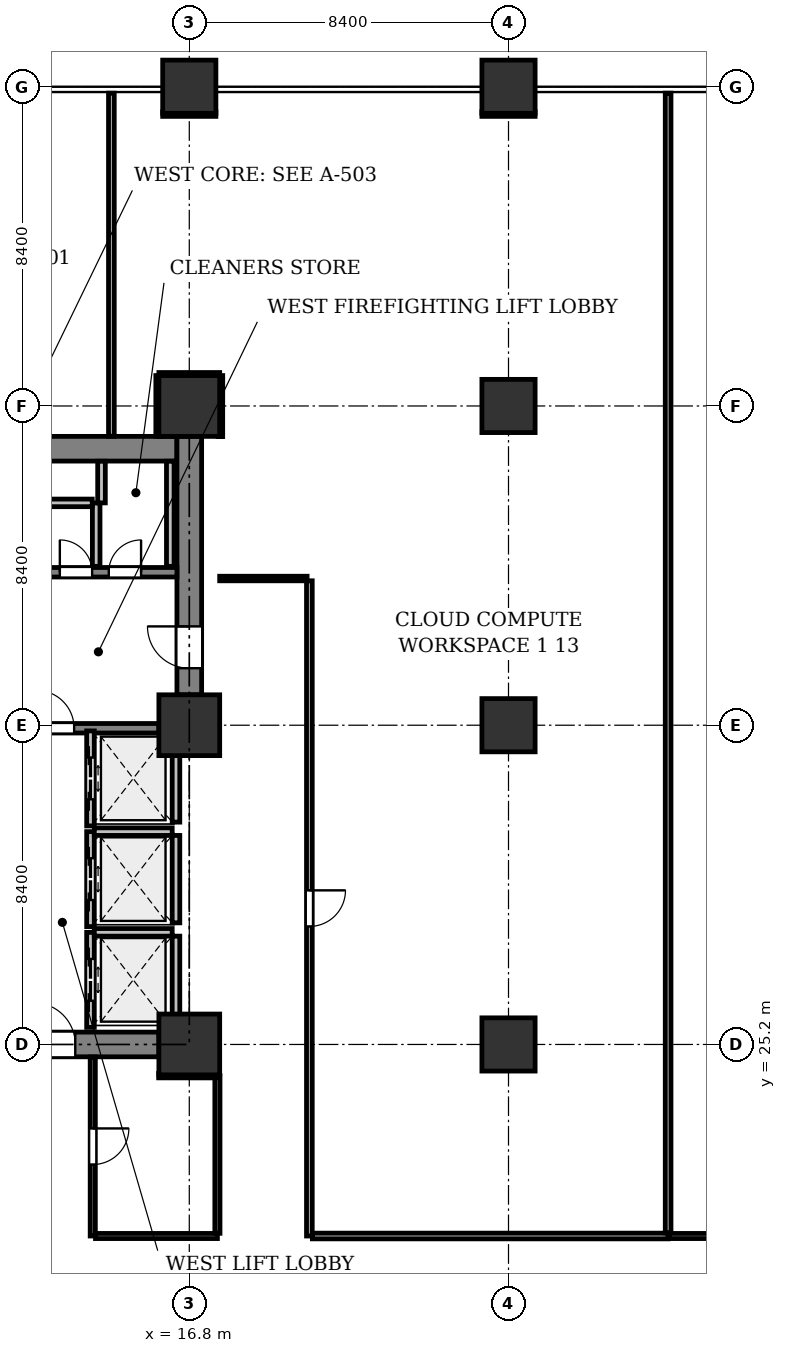
"""IFC4 building model, lengths in metres.
Left out: names, types, materials, properties, quantities, classifications, styles, units other than length and angle.
Written with IfcOpenShell. Run it as: python <this file> out.ifc"""

import sys

from ifc_helpers import new_model, si_unit, direction, frame, frame_2d, origin, origin_2d, place, context, subcontext, project, spatial, rectangle, extrude, element, fill, save


model = new_model("IFC4")
c1 = context("Model", 3, precision=1e-05, world=origin(), true_north=direction((0.0, 1.0)))
c2 = subcontext(c1, "Body", "Model", "MODEL_VIEW")
j1 = project(units=[si_unit("LENGTHUNIT", "METRE"), si_unit("PLANEANGLEUNIT", "RADIAN")], contexts=[c1])
p1 = place(None, origin())
s1 = spatial("IfcSite", under=j1, at=p1, CompositionType="ELEMENT")
p2 = place(p1, origin())
s2 = spatial("IfcBuilding", under=s1, at=p2, CompositionType="ELEMENT")
p3 = place(p2, frame((0.0, 0.0, 10.2)))
s3 = spatial("IfcBuildingStorey", under=s2, at=p3, CompositionType="ELEMENT", Elevation=10.2)
for number, where, z_axis, x_axis in (
    (1, (16.8, 25.2, 0.0), (0.0, 0.0, 1.0), (1.0, 0.0, 0.0)),
    (2, (16.8, 33.6, 0.0), (0.0, 0.0, 1.0), (1.0, 0.0, 0.0)),
    (3, (16.8, 42.0, 0.0), (0.0, 0.0, 1.0), (1.0, 0.0, 0.0)),
):
    element("IfcColumn", number, at=place(p3, frame(where, z_axis=z_axis, x_axis=x_axis)), inside=s3, PredefinedType="COLUMN", context=c2, shape_type="SweptSolid", body=[
        extrude(rectangle(XDim=1.6, YDim=1.6, at=origin_2d()), origin(), (0.0, 0.0, 1.0), 4.8),
    ])
for number, where, z_axis, x_axis in (
    (4, (16.8, 50.4, 0.0), (0.0, 0.0, 1.0), (1.0, 0.0, 0.0)),
    (5, (25.2, 25.2, 0.0), (0.0, 0.0, 1.0), (1.0, 0.0, 0.0)),
    (6, (25.2, 33.6, 0.0), (0.0, 0.0, 1.0), (1.0, 0.0, 0.0)),
    (7, (25.2, 42.0, 0.0), (0.0, 0.0, 1.0), (1.0, 0.0, 0.0)),
    (8, (25.2, 50.4, 0.0), (0.0, 0.0, 1.0), (1.0, 0.0, 0.0)),
):
    element("IfcColumn", number, at=place(p3, frame(where, z_axis=z_axis, x_axis=x_axis)), inside=s3, PredefinedType="COLUMN", context=c2, shape_type="SweptSolid", body=[
        extrude(rectangle(XDim=1.4, YDim=1.4, at=origin_2d()), origin(), (0.0, 0.0, 1.0), 4.8),
    ])
p4 = place(p3, frame((8.725, 40.875, 0.0), z_axis=(0.0, 0.0, 1.0), x_axis=(1.0, 0.0, 0.0)))
e9 = element("IfcWall", 9, at=p4, inside=s3, PredefinedType="SHEAR", context=c2, shape_type="SweptSolid", body=[
    extrude(rectangle(XDim=7.75, YDim=0.65, at=frame_2d((3.875, 0.0))), origin(), (0.0, 0.0, 1.0), 4.525),
])
p5 = place(p3, frame((16.8, 34.4, 0.0), z_axis=(0.0, 0.0, 1.0), x_axis=(0.0, 1.0, 0.0)))
e10 = element("IfcWall", 10, at=p5, inside=s3, PredefinedType="SHEAR", context=c2, shape_type="SweptSolid", body=[
    extrude(rectangle(XDim=6.8, YDim=0.65, at=frame_2d((3.4, 0.0))), origin(), (0.0, 0.0, 1.0), 4.525),
])
p6 = place(p5, frame((0.7, 0.0, 0.0)))
e11 = element("IfcOpeningElement", 11, at=p6, cuts=e10, PredefinedType="OPENING", context=c2, shape_type="SweptSolid", body=[
    extrude(rectangle(XDim=1.1, YDim=2.15, at=frame_2d((0.55, 1.075))), frame((0.0, 0.335, 0.0), z_axis=(0.0, -1.0, 0.0), x_axis=(1.0, 0.0, 0.0)), (0.0, 0.0, 1.0), 0.67),
])
p7 = place(p3, frame((9.2, 25.2, 0.0), z_axis=(0.0, 0.0, 1.0), x_axis=(1.0, 0.0, 0.0)))
e12 = element("IfcWall", 12, at=p7, inside=s3, PredefinedType="SHEAR", context=c2, shape_type="SweptSolid", body=[
    extrude(rectangle(XDim=6.8, YDim=0.65, at=frame_2d((3.4, 0.0))), origin(), (0.0, 0.0, 1.0), 4.525),
])
p8 = place(p7, frame((3.5, 0.0, 0.0)))
e13 = element("IfcOpeningElement", 13, at=p8, cuts=e12, PredefinedType="OPENING", context=c2, shape_type="SweptSolid", body=[
    extrude(rectangle(XDim=1.1, YDim=2.15, at=frame_2d((0.55, 1.075))), frame((0.0, 0.335, 0.0), z_axis=(0.0, -1.0, 0.0), x_axis=(1.0, 0.0, 0.0)), (0.0, 0.0, 1.0), 0.67),
])
p9 = place(p3, frame((12.45, 33.52, 0.0), z_axis=(0.0, 0.0, 1.0), x_axis=(1.0, 0.0, 0.0)))
e14 = element("IfcWall", 14, at=p9, inside=s3, PredefinedType="SHEAR", context=c2, shape_type="SweptSolid", body=[
    extrude(rectangle(XDim=3.55, YDim=0.25, at=frame_2d((1.775, 0.0))), origin(), (0.0, 0.0, 1.0), 4.525),
])
p10 = place(p9, frame((0.32, 0.0, 0.0)))
e15 = element("IfcOpeningElement", 15, at=p10, cuts=e14, PredefinedType="OPENING", context=c2, shape_type="SweptSolid", body=[
    extrude(rectangle(XDim=1.0, YDim=2.15, at=frame_2d((0.5, 1.075))), frame((0.0, 0.135, 0.0), z_axis=(0.0, -1.0, 0.0), x_axis=(1.0, 0.0, 0.0)), (0.0, 0.0, 1.0), 0.27),
])
p11 = place(p3, frame((12.45, 37.625, 0.0), z_axis=(0.0, 0.0, 1.0), x_axis=(1.0, 0.0, 0.0)))
e16 = element("IfcWall", 16, at=p11, inside=s3, PredefinedType="SHEAR", context=c2, shape_type="SweptSolid", body=[
    extrude(rectangle(XDim=4.025, YDim=0.25, at=frame_2d((2.013, 0.0))), origin(), (0.0, 0.0, 1.0), 4.525),
])
p12 = place(p11, frame((0.944, 0.0, 0.0)))
e17 = element("IfcOpeningElement", 17, at=p12, cuts=e16, PredefinedType="OPENING", context=c2, shape_type="SweptSolid", body=[
    extrude(rectangle(XDim=0.85, YDim=2.15, at=frame_2d((0.425, 1.075))), frame((0.0, 0.135, 0.0), z_axis=(0.0, -1.0, 0.0), x_axis=(1.0, 0.0, 0.0)), (0.0, 0.0, 1.0), 0.27),
])
p13 = place(p11, frame((2.231, 0.0, 0.0)))
e18 = element("IfcOpeningElement", 18, at=p13, cuts=e16, PredefinedType="OPENING", context=c2, shape_type="SweptSolid", body=[
    extrude(rectangle(XDim=0.85, YDim=2.15, at=frame_2d((0.425, 1.075))), frame((0.0, 0.135, 0.0), z_axis=(0.0, -1.0, 0.0), x_axis=(1.0, 0.0, 0.0)), (0.0, 0.0, 1.0), 0.27),
])
p14 = place(p3, frame((14.2, 25.65, 0.0), z_axis=(0.0, 0.0, 1.0), x_axis=(0.0, 1.0, 0.0)))
e19 = element("IfcWall", 19, at=p14, inside=s3, PredefinedType="PARTITIONING", context=c2, shape_type="SweptSolid", body=[
    extrude(rectangle(XDim=2.5, YDim=0.2, at=frame_2d((1.25, 0.0))), origin(), (0.0, 0.0, 1.0), 4.525),
])
p15 = place(p14, frame((0.7, 0.0, 0.0)))
e20 = element("IfcOpeningElement", 20, at=p15, cuts=e19, PredefinedType="OPENING", context=c2, shape_type="SweptSolid", body=[
    extrude(rectangle(XDim=1.1, YDim=2.2, at=frame_2d((0.55, 1.1))), frame((0.0, 0.11, 0.0), z_axis=(0.0, -1.0, 0.0), x_axis=(1.0, 0.0, 0.0)), (0.0, 0.0, 1.0), 0.22),
])
p16 = place(p3, frame((16.45, 25.75, 0.0), z_axis=(0.0, 0.0, 1.0), x_axis=(0.0, 1.0, 0.0)))
e21 = element("IfcWall", 21, at=p16, inside=s3, PredefinedType="PARTITIONING", context=c2, shape_type="SweptSolid", body=[
    extrude(rectangle(XDim=2.3, YDim=0.2, at=frame_2d((1.15, 0.0))), origin(), (0.0, 0.0, 1.0), 4.525),
])
p17 = place(p3, frame((14.3, 28.15, 0.0), z_axis=(0.0, 0.0, 1.0), x_axis=(1.0, 0.0, 0.0)))
e22 = element("IfcWall", 22, at=p17, inside=s3, PredefinedType="PARTITIONING", context=c2, shape_type="SweptSolid", body=[
    extrude(rectangle(XDim=2.05, YDim=0.2, at=frame_2d((1.025, 0.0))), origin(), (0.0, 0.0, 1.0), 4.525),
])
p18 = place(p3, frame((14.2, 28.3, 0.0), z_axis=(0.0, 0.0, 1.0), x_axis=(0.0, 1.0, 0.0)))
e23 = element("IfcWall", 23, at=p18, inside=s3, PredefinedType="PARTITIONING", context=c2, shape_type="SweptSolid", body=[
    extrude(rectangle(XDim=2.5, YDim=0.2, at=frame_2d((1.25, 0.0))), origin(), (0.0, 0.0, 1.0), 4.525),
])
p19 = place(p18, frame((0.7, 0.0, 0.0)))
e24 = element("IfcOpeningElement", 24, at=p19, cuts=e23, PredefinedType="OPENING", context=c2, shape_type="SweptSolid", body=[
    extrude(rectangle(XDim=1.1, YDim=2.2, at=frame_2d((0.55, 1.1))), frame((0.0, 0.11, 0.0), z_axis=(0.0, -1.0, 0.0), x_axis=(1.0, 0.0, 0.0)), (0.0, 0.0, 1.0), 0.22),
])
p20 = place(p3, frame((16.45, 28.4, 0.0), z_axis=(0.0, 0.0, 1.0), x_axis=(0.0, 1.0, 0.0)))
e25 = element("IfcWall", 25, at=p20, inside=s3, PredefinedType="PARTITIONING", context=c2, shape_type="SweptSolid", body=[
    extrude(rectangle(XDim=2.3, YDim=0.2, at=frame_2d((1.15, 0.0))), origin(), (0.0, 0.0, 1.0), 4.525),
])
p21 = place(p3, frame((14.3, 30.8, 0.0), z_axis=(0.0, 0.0, 1.0), x_axis=(1.0, 0.0, 0.0)))
e26 = element("IfcWall", 26, at=p21, inside=s3, PredefinedType="PARTITIONING", context=c2, shape_type="SweptSolid", body=[
    extrude(rectangle(XDim=2.05, YDim=0.2, at=frame_2d((1.025, 0.0))), origin(), (0.0, 0.0, 1.0), 4.525),
])
p22 = place(p3, frame((14.2, 30.95, 0.0), z_axis=(0.0, 0.0, 1.0), x_axis=(0.0, 1.0, 0.0)))
e27 = element("IfcWall", 27, at=p22, inside=s3, PredefinedType="PARTITIONING", context=c2, shape_type="SweptSolid", body=[
    extrude(rectangle(XDim=2.5, YDim=0.2, at=frame_2d((1.25, 0.0))), origin(), (0.0, 0.0, 1.0), 4.525),
])
p23 = place(p22, frame((0.7, 0.0, 0.0)))
e28 = element("IfcOpeningElement", 28, at=p23, cuts=e27, PredefinedType="OPENING", context=c2, shape_type="SweptSolid", body=[
    extrude(rectangle(XDim=1.1, YDim=2.2, at=frame_2d((0.55, 1.1))), frame((0.0, 0.11, 0.0), z_axis=(0.0, -1.0, 0.0), x_axis=(1.0, 0.0, 0.0)), (0.0, 0.0, 1.0), 0.22),
])
p24 = place(p3, frame((16.45, 31.05, 0.0), z_axis=(0.0, 0.0, 1.0), x_axis=(0.0, 1.0, 0.0)))
e29 = element("IfcWall", 29, at=p24, inside=s3, PredefinedType="PARTITIONING", context=c2, shape_type="SweptSolid", body=[
    extrude(rectangle(XDim=2.3, YDim=0.2, at=frame_2d((1.15, 0.0))), origin(), (0.0, 0.0, 1.0), 4.525),
])
p25 = place(p3, frame((14.35, 37.78, 0.0), z_axis=(0.0, 0.0, 1.0), x_axis=(0.0, 1.0, 0.0)))
e30 = element("IfcWall", 30, at=p25, inside=s3, PredefinedType="PARTITIONING", context=c2, shape_type="SweptSolid", body=[
    extrude(rectangle(XDim=1.67, YDim=0.2, at=frame_2d((0.835, 0.0))), origin(), (0.0, 0.0, 1.0), 3.425),
])
p26 = place(p3, frame((14.246, 39.45, 0.0), z_axis=(0.0, 0.0, 1.0), x_axis=(-1.0, 0.0, 0.0)))
e31 = element("IfcWall", 31, at=p26, inside=s3, PredefinedType="PARTITIONING", context=c2, shape_type="SweptSolid", body=[
    extrude(rectangle(XDim=1.796, YDim=0.2, at=frame_2d((0.898, 0.0))), origin(), (0.0, 0.0, 1.0), 3.425),
])
p27 = place(p3, frame((16.3, 37.78, 0.0), z_axis=(0.0, 0.0, 1.0), x_axis=(0.0, 1.0, 0.0)))
e32 = element("IfcWall", 32, at=p27, inside=s3, PredefinedType="PARTITIONING", context=c2, shape_type="SweptSolid", body=[
    extrude(rectangle(XDim=2.766, YDim=0.2, at=frame_2d((1.383, 0.0))), origin(), (0.0, 0.0, 1.0), 3.425),
])
p28 = place(p3, frame((14.49, 40.546, 0.0), z_axis=(0.0, 0.0, 1.0), x_axis=(0.0, -1.0, 0.0)))
e33 = element("IfcWall", 33, at=p28, inside=s3, PredefinedType="PARTITIONING", context=c2, shape_type="SweptSolid", body=[
    extrude(rectangle(XDim=1.096, YDim=0.2, at=frame_2d((0.548, 0.0))), origin(), (0.0, 0.0, 1.0), 3.425),
])
p29 = place(p3, frame((14.26, 24.871, 0.0), z_axis=(0.0, 0.0, 1.0), x_axis=(0.0, -1.0, 0.0)))
e34 = element("IfcWall", 34, at=p29, inside=s3, PredefinedType="PARTITIONING", context=c2, shape_type="SweptSolid", body=[
    extrude(rectangle(XDim=4.711, YDim=0.135, at=frame_2d((2.355, 0.0))), origin(), (0.0, 0.0, 1.0), 4.525),
])
p30 = place(p29, frame((1.881, 0.0, 0.0)))
e35 = element("IfcOpeningElement", 35, at=p30, cuts=e34, PredefinedType="OPENING", context=c2, shape_type="SweptSolid", body=[
    extrude(rectangle(XDim=0.95, YDim=2.15, at=frame_2d((0.475, 1.075))), frame((0.0, 0.077, 0.0), z_axis=(0.0, -1.0, 0.0), x_axis=(1.0, 0.0, 0.0)), (0.0, 0.0, 1.0), 0.155),
])
p31 = place(p3, frame((14.332, 20.16, 0.0), z_axis=(0.0, 0.0, 1.0), x_axis=(1.0, 0.0, 0.0)))
e36 = element("IfcWall", 36, at=p31, inside=s3, PredefinedType="PARTITIONING", context=c2, shape_type="SweptSolid", body=[
    extrude(rectangle(XDim=3.208, YDim=0.135, at=frame_2d((1.604, 0.0))), origin(), (0.0, 0.0, 1.0), 3.913),
])
p32 = place(p3, frame((17.54, 20.231, 0.0), z_axis=(0.0, 0.0, 1.0), x_axis=(0.0, 1.0, 0.0)))
e37 = element("IfcWall", 37, at=p32, inside=s3, PredefinedType="PARTITIONING", context=c2, shape_type="SweptSolid", body=[
    extrude(rectangle(XDim=4.148, YDim=0.135, at=frame_2d((2.074, 0.0))), origin(), (0.0, 0.0, 1.0), 4.525),
])
p33 = place(p3, frame((17.54, 24.38, 0.0), z_axis=(0.0, 0.0, 1.0), x_axis=(-0.99999980047, 0.000631711813, 0.0)))
e38 = element("IfcWall", 38, at=p33, inside=s3, PredefinedType="PARTITIONING", context=c2, shape_type="SweptSolid", body=[
    extrude(rectangle(XDim=1.546, YDim=0.12, at=frame_2d((0.773, 0.0))), origin(), (0.0, 0.0, 1.0), 3.913),
])
p34 = place(p3, frame((19.96, 37.4, 0.0), z_axis=(0.0, 0.0, 1.0), x_axis=(0.0, -1.0, 0.0)))
e39 = element("IfcWall", 39, at=p34, inside=s3, PredefinedType="PARTITIONING", context=c2, shape_type="SweptSolid", body=[
    extrude(rectangle(XDim=17.24, YDim=0.15, at=frame_2d((8.62, 0.0))), origin(), (0.0, 0.0, 1.0), 3.725),
])
p35 = place(p34, frame((8.145, 0.0, 0.0)))
e40 = element("IfcOpeningElement", 40, at=p35, cuts=e39, PredefinedType="OPENING", context=c2, shape_type="SweptSolid", body=[
    extrude(rectangle(XDim=0.95, YDim=2.15, at=frame_2d((0.475, 1.075))), frame((0.0, 0.085, 0.0), z_axis=(0.0, -1.0, 0.0), x_axis=(1.0, 0.0, 0.0)), (0.0, 0.0, 1.0), 0.17),
])
p36 = place(p3, frame((20.039, 20.16, 0.0), z_axis=(0.0, 0.0, 1.0), x_axis=(1.0, 0.0, 0.0)))
e41 = element("IfcWall", 41, at=p36, inside=s3, PredefinedType="PARTITIONING", context=c2, shape_type="SweptSolid", body=[
    extrude(rectangle(XDim=9.361, YDim=0.15, at=frame_2d((4.68, 0.0))), origin(), (0.0, 0.0, 1.0), 3.913),
])
p37 = place(p3, frame((29.4, 20.239, 0.0), z_axis=(0.0, 0.0, 1.0), x_axis=(0.0, 1.0, 0.0)))
e42 = element("IfcWall", 42, at=p37, inside=s3, PredefinedType="PARTITIONING", context=c2, shape_type="SweptSolid", body=[
    extrude(rectangle(XDim=29.992, YDim=0.15, at=frame_2d((14.996, 0.0))), origin(), (0.0, 0.0, 1.0), 3.725),
])
for number, where, z_axis, x_axis in (
    (43, (25.9, 49.68, 0.0), (0.0, 0.0, 1.0), (-1.0, 0.0, 0.0)),
    (44, (17.5, 49.68, 0.0), (0.0, 0.0, 1.0), (-1.0, 0.0, 0.0)),
):
    element("IfcWall", number, at=place(p3, frame(where, z_axis=z_axis, x_axis=x_axis)), inside=s3, PredefinedType="PARTITIONING", context=c2, shape_type="SweptSolid", body=[
        extrude(rectangle(XDim=1.4, YDim=0.12, at=frame_2d((0.7, 0.0))), origin(), (0.0, 0.0, 1.0), 3.913),
    ])
p38 = place(p3, frame((14.75, 50.231, 0.0), z_axis=(0.0, 0.0, 1.0), x_axis=(0.0, -1.0, 0.0)))
e45 = element("IfcWall", 45, at=p38, inside=s3, PredefinedType="PARTITIONING", context=c2, shape_type="SweptSolid", body=[
    extrude(rectangle(XDim=9.027, YDim=0.15, at=frame_2d((4.513, 0.0))), origin(), (0.0, 0.0, 1.0), 3.725),
])
p39 = place(p3, frame((15.98, 41.204, 0.0), z_axis=(0.0, 0.0, 1.0), x_axis=(0.0, 1.0, 0.0)))
e46 = element("IfcWall", 46, at=p39, inside=s3, PredefinedType="PARTITIONING", context=c2, shape_type="SweptSolid", body=[
    extrude(rectangle(XDim=1.596, YDim=0.12, at=frame_2d((0.798, 0.0))), origin(), (0.0, 0.0, 1.0), 3.725),
])
p40 = place(p3, frame((16.0, 42.82, 0.0), z_axis=(0.0, 0.0, 1.0), x_axis=(1.0, 0.0, 0.0)))
e47 = element("IfcWall", 47, at=p40, inside=s3, PredefinedType="PARTITIONING", context=c2, shape_type="SweptSolid", body=[
    extrude(rectangle(XDim=1.6, YDim=0.12, at=frame_2d((0.8, 0.0))), origin(), (0.0, 0.0, 1.0), 3.913),
])
p41 = place(p3, frame((17.62, 42.8, 0.0), z_axis=(0.0, 0.0, 1.0), x_axis=(-0.000608087452, -0.999999815115, 0.0)))
e48 = element("IfcWall", 48, at=p41, inside=s3, PredefinedType="PARTITIONING", context=c2, shape_type="SweptSolid", body=[
    extrude(rectangle(XDim=1.606, YDim=0.12, at=frame_2d((0.803, 0.0))), origin(), (0.0, 0.0, 1.0), 3.725),
])
p42 = place(p3, frame((17.6, 37.46, 0.0), z_axis=(0.0, 0.0, 1.0), x_axis=(1.0, 0.0, 0.0)))
e49 = element("IfcWall", 49, at=p42, inside=s3, PredefinedType="PARTITIONING", context=c2, shape_type="SweptSolid", body=[
    extrude(rectangle(XDim=2.3, YDim=0.12, at=frame_2d((1.15, 0.0))), origin(), (0.0, 0.0, 1.0), 4.525),
])
p43 = place(p3, frame((29.42, 20.16, 0.0), z_axis=(0.0, 0.0, 1.0), x_axis=(1.0, 0.0, 0.0)))
e50 = element("IfcWall", 50, at=p43, inside=s3, PredefinedType="PARTITIONING", context=c2, shape_type="SweptSolid", body=[
    extrude(rectangle(XDim=4.976, YDim=0.135, at=frame_2d((2.488, 0.0))), origin(), (0.0, 0.0, 1.0), 3.913),
])
p44 = place(p43, frame((2.013, 0.0, 0.0)))
e51 = element("IfcOpeningElement", 51, at=p44, cuts=e50, PredefinedType="OPENING", context=c2, shape_type="SweptSolid", body=[
    extrude(rectangle(XDim=0.95, YDim=2.15, at=frame_2d((0.475, 1.075))), frame((0.0, 0.077, 0.0), z_axis=(0.0, -1.0, 0.0), x_axis=(1.0, 0.0, 0.0)), (0.0, 0.0, 1.0), 0.155),
])
p45 = place(p6, origin())
e52 = element("IfcDoor", 52, at=p45, inside=s3, OperationType="SINGLE_SWING_RIGHT", PredefinedType="DOOR", context=c2, shape_type="SweptSolid", body=[
    extrude(rectangle(XDim=1.1, YDim=2.15, at=frame_2d((0.55, 1.075))), frame((0.0, 0.025, 0.0), z_axis=(0.0, -1.0, 0.0), x_axis=(1.0, 0.0, 0.0)), (0.0, 0.0, 1.0), 0.05),
])
fill(e11, e52)
p46 = place(p8, origin())
e53 = element("IfcDoor", 53, at=p46, inside=s3, OperationType="SINGLE_SWING_LEFT", PredefinedType="DOOR", context=c2, shape_type="SweptSolid", body=[
    extrude(rectangle(XDim=1.1, YDim=2.15, at=frame_2d((0.55, 1.075))), frame((0.0, 0.025, 0.0), z_axis=(0.0, -1.0, 0.0), x_axis=(1.0, 0.0, 0.0)), (0.0, 0.0, 1.0), 0.05),
])
fill(e13, e53)
p47 = place(p10, origin())
e54 = element("IfcDoor", 54, at=p47, inside=s3, OperationType="SINGLE_SWING_LEFT", PredefinedType="DOOR", context=c2, shape_type="SweptSolid", body=[
    extrude(rectangle(XDim=1.0, YDim=2.15, at=frame_2d((0.5, 1.075))), frame((0.0, 0.025, 0.0), z_axis=(0.0, -1.0, 0.0), x_axis=(1.0, 0.0, 0.0)), (0.0, 0.0, 1.0), 0.05),
])
fill(e15, e54)
p48 = place(p15, origin())
e55 = element("IfcDoor", 55, at=p48, inside=s3, OperationType="DOUBLE_DOOR_SLIDING", PredefinedType="DOOR", context=c2, shape_type="SweptSolid", body=[
    extrude(rectangle(XDim=1.1, YDim=2.2, at=frame_2d((0.55, 1.1))), frame((0.0, 0.025, 0.0), z_axis=(0.0, -1.0, 0.0), x_axis=(1.0, 0.0, 0.0)), (0.0, 0.0, 1.0), 0.05),
])
fill(e20, e55)
p49 = place(p19, origin())
e56 = element("IfcDoor", 56, at=p49, inside=s3, OperationType="DOUBLE_DOOR_SLIDING", PredefinedType="DOOR", context=c2, shape_type="SweptSolid", body=[
    extrude(rectangle(XDim=1.1, YDim=2.2, at=frame_2d((0.55, 1.1))), frame((0.0, 0.025, 0.0), z_axis=(0.0, -1.0, 0.0), x_axis=(1.0, 0.0, 0.0)), (0.0, 0.0, 1.0), 0.05),
])
fill(e24, e56)
p50 = place(p23, origin())
e57 = element("IfcDoor", 57, at=p50, inside=s3, OperationType="DOUBLE_DOOR_SLIDING", PredefinedType="DOOR", context=c2, shape_type="SweptSolid", body=[
    extrude(rectangle(XDim=1.1, YDim=2.2, at=frame_2d((0.55, 1.1))), frame((0.0, 0.025, 0.0), z_axis=(0.0, -1.0, 0.0), x_axis=(1.0, 0.0, 0.0)), (0.0, 0.0, 1.0), 0.05),
])
fill(e28, e57)
p51 = place(p12, origin())
e58 = element("IfcDoor", 58, at=p51, inside=s3, OperationType="SINGLE_SWING_LEFT", PredefinedType="DOOR", context=c2, shape_type="SweptSolid", body=[
    extrude(rectangle(XDim=0.85, YDim=2.15, at=frame_2d((0.425, 1.075))), frame((0.0, 0.025, 0.0), z_axis=(0.0, -1.0, 0.0), x_axis=(1.0, 0.0, 0.0)), (0.0, 0.0, 1.0), 0.05),
])
fill(e17, e58)
p52 = place(p13, origin())
e59 = element("IfcDoor", 59, at=p52, inside=s3, OperationType="SINGLE_SWING_RIGHT", PredefinedType="DOOR", context=c2, shape_type="SweptSolid", body=[
    extrude(rectangle(XDim=0.85, YDim=2.15, at=frame_2d((0.425, 1.075))), frame((0.0, 0.025, 0.0), z_axis=(0.0, -1.0, 0.0), x_axis=(1.0, 0.0, 0.0)), (0.0, 0.0, 1.0), 0.05),
])
fill(e18, e59)
p53 = place(p30, origin())
e60 = element("IfcDoor", 60, at=p53, inside=s3, OperationType="SINGLE_SWING_LEFT", PredefinedType="DOOR", context=c2, shape_type="SweptSolid", body=[
    extrude(rectangle(XDim=0.95, YDim=2.15, at=frame_2d((0.475, 1.075))), frame((0.0, 0.025, 0.0), z_axis=(0.0, -1.0, 0.0), x_axis=(1.0, 0.0, 0.0)), (0.0, 0.0, 1.0), 0.05),
])
fill(e35, e60)
p54 = place(p35, origin())
e61 = element("IfcDoor", 61, at=p54, inside=s3, OperationType="SINGLE_SWING_LEFT", PredefinedType="DOOR", context=c2, shape_type="SweptSolid", body=[
    extrude(rectangle(XDim=0.95, YDim=2.15, at=frame_2d((0.475, 1.075))), frame((0.0, 0.025, 0.0), z_axis=(0.0, -1.0, 0.0), x_axis=(1.0, 0.0, 0.0)), (0.0, 0.0, 1.0), 0.05),
])
fill(e40, e61)
save(model, sys.argv[1])
